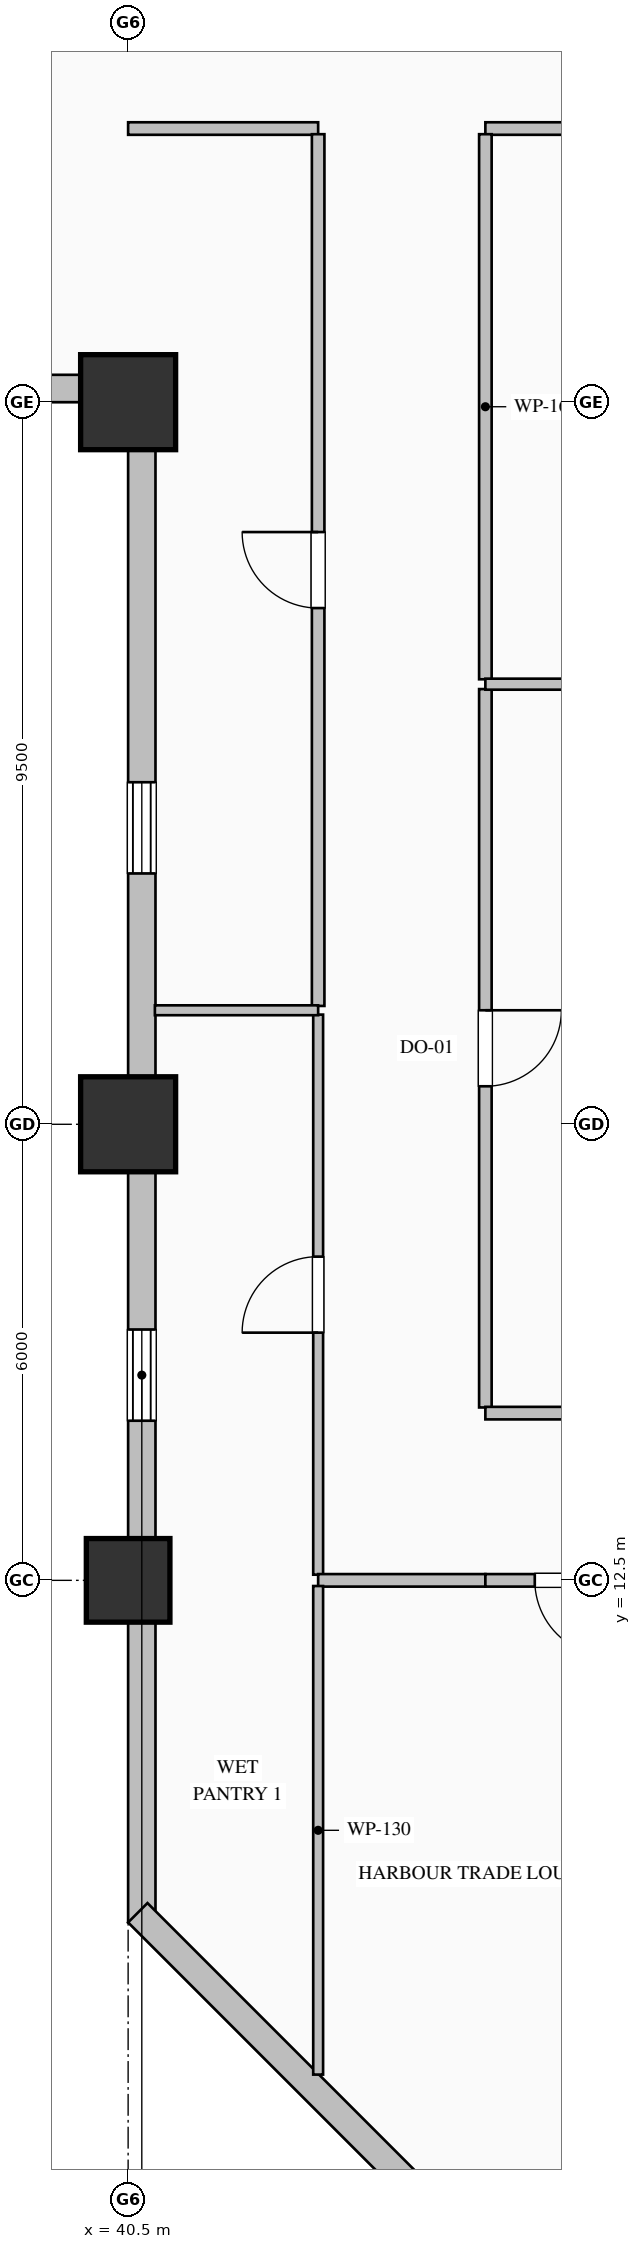
"""IFC4 building model, lengths in metres.
Left out: names, types, materials, properties, quantities, classifications, styles, units other than length and angle.
Written with IfcOpenShell. Run it as: python <this file> out.ifc"""

import sys

from ifc_helpers import new_model, si_unit, direction, frame, frame_2d, origin, origin_2d, place, context, subcontext, project, spatial, rectangle, hollow_rectangle, extrude, element, fill, save


model = new_model("IFC4")
c1 = context("Model", 3, precision=1e-05, world=origin(), true_north=direction((0.0, 1.0)))
c2 = subcontext(c1, "Body", "Model", "MODEL_VIEW")
j1 = project(units=[si_unit("LENGTHUNIT", "METRE"), si_unit("PLANEANGLEUNIT", "RADIAN")], contexts=[c1])
p1 = place(None, origin())
s1 = spatial("IfcSite", under=j1, at=p1, CompositionType="ELEMENT")
p2 = place(p1, origin())
s2 = spatial("IfcBuilding", under=s1, at=p2, CompositionType="ELEMENT")
p3 = place(p2, frame((0.0, 0.0, 92.2)))
s3 = spatial("IfcBuildingStorey", under=s2, at=p3, CompositionType="ELEMENT", Elevation=92.2)
p4 = place(p3, frame((40.5, 12.5, 0.0), z_axis=(0.0, 0.0, 1.0), x_axis=(1.0, 0.0, 0.0)))
e1 = element("IfcColumn", 1, at=p4, inside=s3, PredefinedType="COLUMN", context=c2, shape_type="SweptSolid", body=[
    extrude(hollow_rectangle(XDim=1.1, YDim=1.1, WallThickness=0.04, at=origin_2d()), origin(), (0.0, 0.0, 1.0), 4.0),
])
for number, where, z_axis, x_axis in (
    (2, (40.5, 18.5, 0.0), (0.0, 0.0, 1.0), (1.0, 0.0, 0.0)),
    (3, (40.5, 28.0, 0.0), (0.0, 0.0, 1.0), (1.0, 0.0, 0.0)),
):
    element("IfcColumn", number, at=place(p3, frame(where, z_axis=z_axis, x_axis=x_axis)), inside=s3, PredefinedType="COLUMN", context=c2, shape_type="SweptSolid", body=[
        extrude(hollow_rectangle(XDim=1.25, YDim=1.25, WallThickness=0.045, at=origin_2d()), origin(), (0.0, 0.0, 1.0), 4.0),
    ])
p5 = place(p3, frame((40.68, 8.0, 0.0), z_axis=(0.0, 0.0, 1.0), x_axis=(0.0, 1.0, 0.0)))
e4 = element("IfcWall", 4, at=p5, inside=s3, PredefinedType="SOLIDWALL", context=c2, shape_type="SweptSolid", body=[
    extrude(rectangle(XDim=20.36, YDim=0.36, at=frame_2d((10.18, 0.0))), origin(), (0.0, 0.0, 1.0), 3.05),
])
p6 = place(p5, frame((6.6, 0.0, 0.7)))
e5 = element("IfcOpeningElement", 5, at=p6, cuts=e4, PredefinedType="OPENING", context=c2, shape_type="SweptSolid", body=[
    extrude(rectangle(XDim=1.2, YDim=1.85, at=frame_2d((0.6, 0.925))), frame((0.0, 0.19, 0.0), z_axis=(0.0, -1.0, 0.0), x_axis=(1.0, 0.0, 0.0)), (0.0, 0.0, 1.0), 0.38),
])
p7 = place(p5, frame((13.8, 0.0, 0.7)))
e6 = element("IfcOpeningElement", 6, at=p7, cuts=e4, PredefinedType="OPENING", context=c2, shape_type="SweptSolid", body=[
    extrude(rectangle(XDim=1.2, YDim=1.85, at=frame_2d((0.6, 0.925))), frame((0.0, 0.19, 0.0), z_axis=(0.0, -1.0, 0.0), x_axis=(1.0, 0.0, 0.0)), (0.0, 0.0, 1.0), 0.38),
])
p8 = place(p3, frame((40.52, 28.18, 0.0), z_axis=(0.0, 0.0, 1.0), x_axis=(-1.0, 0.0, 0.0)))
e7 = element("IfcWall", 7, at=p8, inside=s3, PredefinedType="SOLIDWALL", context=c2, shape_type="SweptSolid", body=[
    extrude(rectangle(XDim=36.52, YDim=0.36, at=frame_2d((18.26, 0.0))), origin(), (0.0, 0.0, 1.0), 3.05),
])
p9 = place(p8, frame((13.8, 0.0, 0.7)))
e8 = element("IfcOpeningElement", 8, at=p9, cuts=e7, PredefinedType="OPENING", context=c2, shape_type="SweptSolid", body=[
    extrude(rectangle(XDim=1.2, YDim=1.85, at=frame_2d((0.6, 0.925))), frame((0.0, 0.19, 0.0), z_axis=(0.0, -1.0, 0.0), x_axis=(1.0, 0.0, 0.0)), (0.0, 0.0, 1.0), 0.38),
])
p10 = place(p8, frame((21.0, 0.0, 0.7)))
e9 = element("IfcOpeningElement", 9, at=p10, cuts=e7, PredefinedType="OPENING", context=c2, shape_type="SweptSolid", body=[
    extrude(rectangle(XDim=1.2, YDim=1.85, at=frame_2d((0.6, 0.925))), frame((0.0, 0.19, 0.0), z_axis=(0.0, -1.0, 0.0), x_axis=(1.0, 0.0, 0.0)), (0.0, 0.0, 1.0), 0.38),
])
p11 = place(p3, frame((44.627, 4.127, 0.0), z_axis=(0.0, 0.0, 1.0), x_axis=(-0.707106781187, 0.707106781187, 0.0)))
e10 = element("IfcWall", 10, at=p11, inside=s3, PredefinedType="SOLIDWALL", context=c2, shape_type="SweptSolid", body=[
    extrude(rectangle(XDim=5.657, YDim=0.36, at=frame_2d((2.828, 0.0))), origin(), (0.0, 0.0, 1.0), 3.75),
])
p12 = place(p3, frame((56.5, 31.6, 0.0), z_axis=(0.0, 0.0, 1.0), x_axis=(-1.0, 0.0, 0.0)))
e11 = element("IfcWall", 11, at=p12, inside=s3, PredefinedType="PARTITIONING", context=c2, shape_type="SweptSolid", body=[
    extrude(rectangle(XDim=11.3, YDim=0.165, at=frame_2d((5.65, 0.0))), origin(), (0.0, 0.0, 1.0), 3.75),
])
p13 = place(p12, frame((5.15, 0.0, 0.0)))
e12 = element("IfcOpeningElement", 12, at=p13, cuts=e11, PredefinedType="OPENING", context=c2, shape_type="SweptSolid", body=[
    extrude(rectangle(XDim=1.0, YDim=2.15, at=frame_2d((0.5, 1.075))), frame((0.0, 0.093, 0.0), z_axis=(0.0, -1.0, 0.0), x_axis=(1.0, 0.0, 0.0)), (0.0, 0.0, 1.0), 0.185),
])
p14 = place(p3, frame((43.0, 31.6, 0.0), z_axis=(0.0, 0.0, 1.0), x_axis=(-1.0, 0.0, 0.0)))
e13 = element("IfcWall", 13, at=p14, inside=s3, PredefinedType="PARTITIONING", context=c2, shape_type="SweptSolid", body=[
    extrude(rectangle(XDim=2.5, YDim=0.165, at=frame_2d((1.25, 0.0))), origin(), (0.0, 0.0, 1.0), 3.75),
])
p15 = place(p3, frame((45.2, 31.525, 0.0), z_axis=(0.0, 0.0, 1.0), x_axis=(0.0, -1.0, 0.0)))
e14 = element("IfcWall", 14, at=p15, inside=s3, PredefinedType="PARTITIONING", context=c2, shape_type="SweptSolid", body=[
    extrude(rectangle(XDim=7.171, YDim=0.165, at=frame_2d((3.585, 0.0))), origin(), (0.0, 0.0, 1.0), 3.75),
])
p16 = place(p3, frame((45.2, 24.226, 0.0), z_axis=(0.0, 0.0, 1.0), x_axis=(0.0, -1.0, 0.0)))
e15 = element("IfcWall", 15, at=p16, inside=s3, PredefinedType="PARTITIONING", context=c2, shape_type="SweptSolid", body=[
    extrude(rectangle(XDim=9.451, YDim=0.165, at=frame_2d((4.726, 0.0))), origin(), (0.0, 0.0, 1.0), 3.75),
])
p17 = place(p16, frame((4.226, 0.0, 0.0)))
e16 = element("IfcOpeningElement", 16, at=p17, cuts=e15, PredefinedType="OPENING", context=c2, shape_type="SweptSolid", body=[
    extrude(rectangle(XDim=1.0, YDim=2.15, at=frame_2d((0.5, 1.075))), frame((0.0, 0.093, 0.0), z_axis=(0.0, -1.0, 0.0), x_axis=(1.0, 0.0, 0.0)), (0.0, 0.0, 1.0), 0.185),
])
p18 = place(p3, frame((43.0, 12.574, 0.0), z_axis=(0.0, 0.0, 1.0), x_axis=(0.0, 1.0, 0.0)))
e17 = element("IfcWall", 17, at=p18, inside=s3, PredefinedType="PARTITIONING", context=c2, shape_type="SweptSolid", body=[
    extrude(rectangle(XDim=7.369, YDim=0.13, at=frame_2d((3.684, 0.0))), origin(), (0.0, 0.0, 1.0), 3.75),
])
p19 = place(p18, frame((3.184, 0.0, 0.0)))
e18 = element("IfcOpeningElement", 18, at=p19, cuts=e17, PredefinedType="OPENING", context=c2, shape_type="SweptSolid", body=[
    extrude(rectangle(XDim=1.0, YDim=2.15, at=frame_2d((0.5, 1.075))), frame((0.0, 0.075, 0.0), z_axis=(0.0, -1.0, 0.0), x_axis=(1.0, 0.0, 0.0)), (0.0, 0.0, 1.0), 0.15),
])
p20 = place(p3, frame((43.0, 20.057, 0.0), z_axis=(0.0, 0.0, 1.0), x_axis=(0.0, 1.0, 0.0)))
e19 = element("IfcWall", 19, at=p20, inside=s3, PredefinedType="PARTITIONING", context=c2, shape_type="SweptSolid", body=[
    extrude(rectangle(XDim=11.469, YDim=0.165, at=frame_2d((5.734, 0.0))), origin(), (0.0, 0.0, 1.0), 3.75),
])
p21 = place(p20, frame((5.234, 0.0, 0.0)))
e20 = element("IfcOpeningElement", 20, at=p21, cuts=e19, PredefinedType="OPENING", context=c2, shape_type="SweptSolid", body=[
    extrude(rectangle(XDim=1.0, YDim=2.15, at=frame_2d((0.5, 1.075))), frame((0.0, 0.093, 0.0), z_axis=(0.0, -1.0, 0.0), x_axis=(1.0, 0.0, 0.0)), (0.0, 0.0, 1.0), 0.185),
])
p22 = place(p3, frame((45.2, 12.5, 0.0), z_axis=(0.0, 0.0, 1.0), x_axis=(-1.0, 0.0, 0.0)))
e21 = element("IfcWall", 21, at=p22, inside=s3, PredefinedType="PARTITIONING", context=c2, shape_type="SweptSolid", body=[
    extrude(rectangle(XDim=2.2, YDim=0.165, at=frame_2d((1.1, 0.0))), origin(), (0.0, 0.0, 1.0), 3.042),
])
p23 = place(p3, frame((45.2, 14.7, 0.0), z_axis=(0.0, 0.0, 1.0), x_axis=(1.0, 0.0, 0.0)))
e22 = element("IfcWall", 22, at=p23, inside=s3, PredefinedType="PARTITIONING", context=c2, shape_type="SweptSolid", body=[
    extrude(rectangle(XDim=5.3, YDim=0.165, at=frame_2d((2.65, 0.0))), origin(), (0.0, 0.0, 1.0), 3.75),
])
p24 = place(p3, frame((47.5, 12.5, 0.0), z_axis=(0.0, 0.0, 1.0), x_axis=(-1.0, 0.0, 0.0)))
e23 = element("IfcWall", 23, at=p24, inside=s3, PredefinedType="PARTITIONING", context=c2, shape_type="SweptSolid", body=[
    extrude(rectangle(XDim=2.3, YDim=0.165, at=frame_2d((1.15, 0.0))), origin(), (0.0, 0.0, 1.0), 3.042),
])
p25 = place(p24, frame((0.65, 0.0, 0.0)))
e24 = element("IfcOpeningElement", 24, at=p25, cuts=e23, PredefinedType="OPENING", context=c2, shape_type="SweptSolid", body=[
    extrude(rectangle(XDim=1.0, YDim=2.15, at=frame_2d((0.5, 1.075))), frame((0.0, 0.093, 0.0), z_axis=(0.0, -1.0, 0.0), x_axis=(1.0, 0.0, 0.0)), (0.0, 0.0, 1.0), 0.185),
])
p26 = place(p3, frame((50.5, 24.29, 0.0), z_axis=(0.0, 0.0, 1.0), x_axis=(-1.0, 0.0, 0.0)))
e25 = element("IfcWall", 25, at=p26, inside=s3, PredefinedType="PARTITIONING", context=c2, shape_type="SweptSolid", body=[
    extrude(rectangle(XDim=5.3, YDim=0.145, at=frame_2d((2.65, 0.0))), origin(), (0.0, 0.0, 1.0), 3.75),
])
p27 = place(p3, frame((40.852, 20.0, 0.0), z_axis=(0.0, 0.0, 1.0), x_axis=(1.0, 0.0, 0.0)))
e26 = element("IfcWall", 26, at=p27, inside=s3, PredefinedType="PARTITIONING", context=c2, shape_type="SweptSolid", body=[
    extrude(rectangle(XDim=2.148, YDim=0.13, at=frame_2d((1.074, 0.0))), origin(), (0.0, 0.0, 1.0), 3.75),
])
p28 = place(p3, frame((43.0, 12.426, 0.0), z_axis=(0.0, 0.0, 1.0), x_axis=(0.0, -1.0, 0.0)))
e27 = element("IfcWall", 27, at=p28, inside=s3, PredefinedType="PARTITIONING", context=c2, shape_type="SweptSolid", body=[
    extrude(rectangle(XDim=6.428, YDim=0.13, at=frame_2d((3.214, 0.0))), origin(), (0.0, 0.0, 1.0), 3.75),
])
p29 = place(p6, origin())
e28 = element("IfcWindow", 28, at=p29, inside=s3, PartitioningType="DOUBLE_PANEL_VERTICAL", PredefinedType="WINDOW", context=c2, shape_type="SweptSolid", body=[
    extrude(rectangle(XDim=1.2, YDim=1.85, at=frame_2d((0.6, 0.925))), frame((0.0, 0.15, 0.0), z_axis=(0.0, -1.0, 0.0), x_axis=(1.0, 0.0, 0.0)), (0.0, 0.0, 1.0), 0.06),
])
fill(e5, e28)
p30 = place(p7, origin())
e29 = element("IfcWindow", 29, at=p30, inside=s3, PartitioningType="DOUBLE_PANEL_VERTICAL", PredefinedType="WINDOW", context=c2, shape_type="SweptSolid", body=[
    extrude(rectangle(XDim=1.2, YDim=1.85, at=frame_2d((0.6, 0.925))), frame((0.0, 0.15, 0.0), z_axis=(0.0, -1.0, 0.0), x_axis=(1.0, 0.0, 0.0)), (0.0, 0.0, 1.0), 0.06),
])
fill(e6, e29)
p31 = place(p17, origin())
e30 = element("IfcDoor", 30, at=p31, inside=s3, OperationType="SINGLE_SWING_LEFT", PredefinedType="DOOR", context=c2, shape_type="SweptSolid", body=[
    extrude(rectangle(XDim=1.0, YDim=2.15, at=frame_2d((0.5, 1.075))), frame((0.0, 0.025, 0.0), z_axis=(0.0, -1.0, 0.0), x_axis=(1.0, 0.0, 0.0)), (0.0, 0.0, 1.0), 0.05),
])
fill(e16, e30)
p32 = place(p19, origin())
e31 = element("IfcDoor", 31, at=p32, inside=s3, OperationType="SINGLE_SWING_LEFT", PredefinedType="DOOR", context=c2, shape_type="SweptSolid", body=[
    extrude(rectangle(XDim=1.0, YDim=2.15, at=frame_2d((0.5, 1.075))), frame((0.0, 0.025, 0.0), z_axis=(0.0, -1.0, 0.0), x_axis=(1.0, 0.0, 0.0)), (0.0, 0.0, 1.0), 0.05),
])
fill(e18, e31)
p33 = place(p21, origin())
e32 = element("IfcDoor", 32, at=p33, inside=s3, OperationType="SINGLE_SWING_RIGHT", PredefinedType="DOOR", context=c2, shape_type="SweptSolid", body=[
    extrude(rectangle(XDim=1.0, YDim=2.15, at=frame_2d((0.5, 1.075))), frame((0.0, 0.025, 0.0), z_axis=(0.0, -1.0, 0.0), x_axis=(1.0, 0.0, 0.0)), (0.0, 0.0, 1.0), 0.05),
])
fill(e20, e32)
p34 = place(p25, origin())
e33 = element("IfcDoor", 33, at=p34, inside=s3, OperationType="SINGLE_SWING_LEFT", PredefinedType="DOOR", context=c2, shape_type="SweptSolid", body=[
    extrude(rectangle(XDim=1.0, YDim=2.15, at=frame_2d((0.5, 1.075))), frame((0.0, 0.025, 0.0), z_axis=(0.0, -1.0, 0.0), x_axis=(1.0, 0.0, 0.0)), (0.0, 0.0, 1.0), 0.05),
])
fill(e24, e33)
save(model, sys.argv[1])
